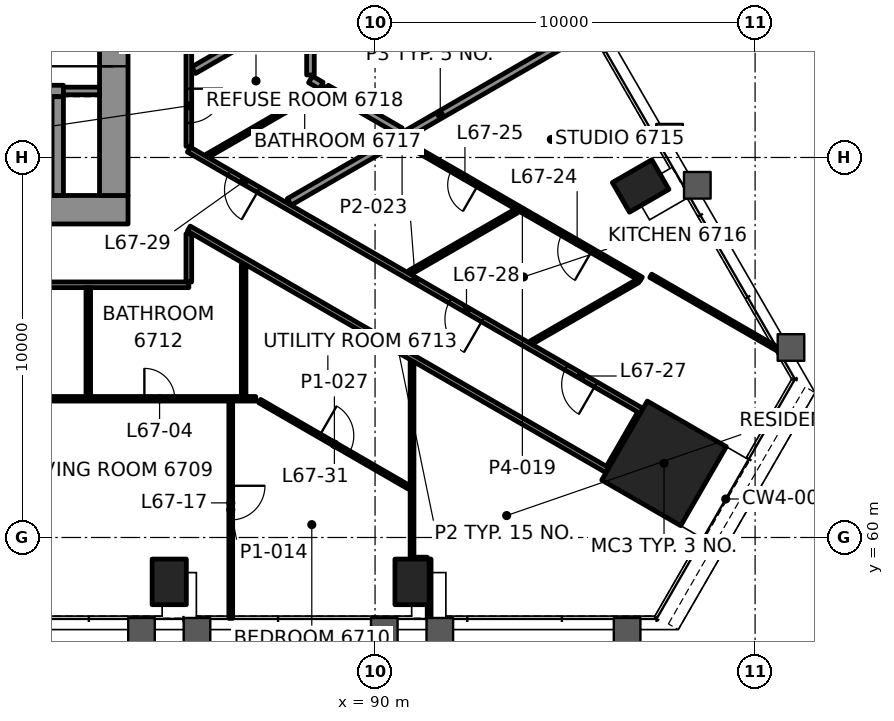
"""IFC4 building model, lengths in metres.
Left out: names, types, materials, properties, quantities, classifications, styles, units other than length and angle.
Written with IfcOpenShell. Run it as: python <this file> out.ifc"""

import sys

from ifc_helpers import new_model, si_unit, direction, frame, frame_2d, origin, origin_2d, place, context, subcontext, project, spatial, rectangle, hollow_rectangle, extrude, element, fill, save


model = new_model("IFC4")
c1 = context("Model", 3, precision=1e-05, world=origin(), true_north=direction((0.0, 1.0)))
c2 = subcontext(c1, "Body", "Model", "MODEL_VIEW")
j1 = project(units=[si_unit("LENGTHUNIT", "METRE"), si_unit("PLANEANGLEUNIT", "RADIAN")], contexts=[c1])
p1 = place(None, origin())
s1 = spatial("IfcSite", under=j1, at=p1, CompositionType="ELEMENT")
p2 = place(p1, origin())
s2 = spatial("IfcBuilding", under=s1, at=p2, CompositionType="ELEMENT")
p3 = place(p2, frame((0.0, 0.0, 281.1)))
s3 = spatial("IfcBuildingStorey", under=s2, at=p3, CompositionType="ELEMENT", Elevation=281.1)
p4 = place(p3, frame((97.604, 61.95, 0.0), z_axis=(0.0, 0.0, 1.0), x_axis=(0.5, 0.866025403784, 0.0)))
e1 = element("IfcColumn", 1, at=p4, inside=s3, PredefinedType="COLUMN", context=c2, shape_type="SweptSolid", body=[
    extrude(rectangle(XDim=2.4, YDim=2.4, at=origin_2d()), origin(), (0.0, 0.0, 1.0), 3.5),
])
for number, where, z_axis, x_axis in (
    (2, (84.584, 58.832, -0.0), (0.0, 0.0, 1.0), (1.0, 0.0, 0.0)),
    (3, (90.973, 58.832, -0.0), (0.0, 0.0, 1.0), (1.0, 0.0, 0.0)),
    (4, (96.989, 69.251, -0.0), (0.0, 0.0, 1.0), (-0.5, 0.866, 0.0)),
):
    element("IfcColumn", number, at=place(p3, frame(where, z_axis=z_axis, x_axis=x_axis)), inside=s3, PredefinedType="COLUMN", context=c2, shape_type="SweptSolid", body=[
        extrude(hollow_rectangle(XDim=0.9, YDim=1.2, WallThickness=0.06, at=origin_2d()), origin(), (0.0, 0.0, 1.0), 3.5),
    ])
p5 = place(p3, frame((66.5, 68.625, 0.0), z_axis=(0.0, 0.0, 1.0), x_axis=(1.0, 0.0, 0.0)))
e5 = element("IfcWall", 5, at=p5, inside=s3, PredefinedType="SHEAR", context=c2, shape_type="SweptSolid", body=[
    extrude(rectangle(XDim=17.0, YDim=0.75, at=frame_2d((8.5, 0.0))), origin(), (0.0, 0.0, 1.0), 3.3),
])
p6 = place(p5, frame((2.7, 0.0, 0.0)))
e6 = element("IfcOpeningElement", 6, at=p6, cuts=e5, PredefinedType="OPENING", context=c2, shape_type="SweptSolid", body=[
    extrude(rectangle(XDim=0.9, YDim=2.1, at=frame_2d((0.45, 1.05))), frame((0.0, 0.385, 0.0), z_axis=(0.0, -1.0, 0.0), x_axis=(1.0, 0.0, 0.0)), (0.0, 0.0, 1.0), 0.77),
])
p7 = place(p3, frame((83.125, 69.0, 0.0), z_axis=(0.0, 0.0, 1.0), x_axis=(0.0, 1.0, 0.0)))
e7 = element("IfcWall", 7, at=p7, inside=s3, PredefinedType="SHEAR", context=c2, shape_type="SweptSolid", body=[
    extrude(rectangle(XDim=12.0, YDim=0.75, at=frame_2d((6.0, 0.0))), origin(), (0.0, 0.0, 1.0), 3.3),
])
p8 = place(p7, frame((3.4, 0.0, 0.0)))
e8 = element("IfcOpeningElement", 8, at=p8, cuts=e7, PredefinedType="OPENING", context=c2, shape_type="SweptSolid", body=[
    extrude(rectangle(XDim=1.8, YDim=2.1, at=frame_2d((0.9, 1.05))), frame((0.0, 0.385, 0.0), z_axis=(0.0, -1.0, 0.0), x_axis=(1.0, 0.0, 0.0)), (0.0, 0.0, 1.0), 0.77),
])
p9 = place(p3, frame((70.3, 71.75, 0.0), z_axis=(0.0, 0.0, 1.0), x_axis=(1.0, 0.0, 0.0)))
e9 = element("IfcWall", 9, at=p9, inside=s3, PredefinedType="SHEAR", context=c2, shape_type="SweptSolid", body=[
    extrude(rectangle(XDim=11.5, YDim=0.3, at=frame_2d((5.75, 0.0))), origin(), (0.0, 0.0, 1.0), 3.3),
])
p10 = place(p9, frame((1.0, 0.0, 0.0)))
e10 = element("IfcOpeningElement", 10, at=p10, cuts=e9, PredefinedType="OPENING", context=c2, shape_type="SweptSolid", body=[
    extrude(rectangle(XDim=1.1, YDim=2.1, at=frame_2d((0.55, 1.05))), frame((0.0, 0.16, 0.0), z_axis=(0.0, -1.0, 0.0), x_axis=(1.0, 0.0, 0.0)), (0.0, 0.0, 1.0), 0.32),
])
p11 = place(p9, frame((3.8, 0.0, 0.0)))
e11 = element("IfcOpeningElement", 11, at=p11, cuts=e9, PredefinedType="OPENING", context=c2, shape_type="SweptSolid", body=[
    extrude(rectangle(XDim=1.1, YDim=2.1, at=frame_2d((0.55, 1.05))), frame((0.0, 0.16, 0.0), z_axis=(0.0, -1.0, 0.0), x_axis=(1.0, 0.0, 0.0)), (0.0, 0.0, 1.0), 0.32),
])
p12 = place(p9, frame((6.6, 0.0, 0.0)))
e12 = element("IfcOpeningElement", 12, at=p12, cuts=e9, PredefinedType="OPENING", context=c2, shape_type="SweptSolid", body=[
    extrude(rectangle(XDim=1.1, YDim=2.1, at=frame_2d((0.55, 1.05))), frame((0.0, 0.16, 0.0), z_axis=(0.0, -1.0, 0.0), x_axis=(1.0, 0.0, 0.0)), (0.0, 0.0, 1.0), 0.32),
])
p13 = place(p9, frame((9.4, 0.0, 0.0)))
e13 = element("IfcOpeningElement", 13, at=p13, cuts=e9, PredefinedType="OPENING", context=c2, shape_type="SweptSolid", body=[
    extrude(rectangle(XDim=1.1, YDim=2.1, at=frame_2d((0.55, 1.05))), frame((0.0, 0.16, 0.0), z_axis=(0.0, -1.0, 0.0), x_axis=(1.0, 0.0, 0.0)), (0.0, 0.0, 1.0), 0.32),
])
p14 = place(p3, frame((81.65, 69.0, 0.0), z_axis=(0.0, 0.0, 1.0), x_axis=(0.0, 1.0, 0.0)))
e14 = element("IfcWall", 14, at=p14, inside=s3, PredefinedType="SHEAR", context=c2, shape_type="SweptSolid", body=[
    extrude(rectangle(XDim=2.6, YDim=0.3, at=frame_2d((1.3, 0.0))), origin(), (0.0, 0.0, 1.0), 3.3),
])
p15 = place(p3, frame((91.023, 59.432, 0.0), z_axis=(0.0, 0.0, 1.0), x_axis=(1.0, 0.0, 0.0)))
e15 = element("IfcWall", 15, at=p15, inside=s3, PredefinedType="PARTITIONING", context=c2, shape_type="SweptSolid", body=[
    extrude(rectangle(XDim=0.349, YDim=0.1, at=frame_2d((0.175, 0.0))), origin(), (0.0, 0.0, 1.0), 2.7),
])
p16 = place(p3, frame((73.935, 63.65, 0.0), z_axis=(0.0, 0.0, 1.0), x_axis=(1.0, 0.0, 0.0)))
e16 = element("IfcWall", 16, at=p16, inside=s3, PredefinedType="PARTITIONING", context=c2, shape_type="SweptSolid", body=[
    extrude(rectangle(XDim=12.924, YDim=0.12, at=frame_2d((6.462, 0.0))), origin(), (0.0, 0.0, 1.0), 2.7),
])
p17 = place(p16, frame((6.197, 0.0, 0.0)))
e17 = element("IfcOpeningElement", 17, at=p17, cuts=e16, PredefinedType="OPENING", context=c2, shape_type="SweptSolid", body=[
    extrude(rectangle(XDim=0.9, YDim=2.1, at=frame_2d((0.45, 1.05))), frame((0.0, 0.07, 0.0), z_axis=(0.0, -1.0, 0.0), x_axis=(1.0, 0.0, 0.0)), (0.0, 0.0, 1.0), 0.14),
])
p18 = place(p16, frame((9.995, 0.0, 0.0)))
e18 = element("IfcOpeningElement", 18, at=p18, cuts=e16, PredefinedType="OPENING", context=c2, shape_type="SweptSolid", body=[
    extrude(rectangle(XDim=0.8, YDim=2.1, at=frame_2d((0.4, 1.05))), frame((0.0, 0.07, 0.0), z_axis=(0.0, -1.0, 0.0), x_axis=(1.0, 0.0, 0.0)), (0.0, 0.0, 1.0), 0.14),
])
p19 = place(p3, frame((85.1, 66.65, 0.0), z_axis=(0.0, 0.0, 1.0), x_axis=(-1.0, 0.0, 0.0)))
e19 = element("IfcWall", 19, at=p19, inside=s3, PredefinedType="PARTITIONING", context=c2, shape_type="SweptSolid", body=[
    extrude(rectangle(XDim=20.2, YDim=0.15, at=frame_2d((10.1, 0.0))), origin(), (0.0, 0.0, 1.0), 2.7),
])
p20 = place(p19, frame((6.405, 0.0, 0.0)))
e20 = element("IfcOpeningElement", 20, at=p20, cuts=e19, PredefinedType="OPENING", context=c2, shape_type="SweptSolid", body=[
    extrude(rectangle(XDim=1.0, YDim=2.1, at=frame_2d((0.5, 1.05))), frame((0.0, 0.085, 0.0), z_axis=(0.0, -1.0, 0.0), x_axis=(1.0, 0.0, 0.0)), (0.0, 0.0, 1.0), 0.17),
])
p21 = place(p19, frame((12.845, 0.0, 0.0)))
e21 = element("IfcOpeningElement", 21, at=p21, cuts=e19, PredefinedType="OPENING", context=c2, shape_type="SweptSolid", body=[
    extrude(rectangle(XDim=0.9, YDim=2.1, at=frame_2d((0.45, 1.05))), frame((0.0, 0.085, 0.0), z_axis=(0.0, -1.0, 0.0), x_axis=(1.0, 0.0, 0.0)), (0.0, 0.0, 1.0), 0.17),
])
p22 = place(p3, frame((94.104, 65.126, 0.0), z_axis=(0.0, 0.0, 1.0), x_axis=(0.866000336211, 0.500043415797, 0.0)))
e22 = element("IfcWall", 22, at=p22, inside=s3, PredefinedType="PARTITIONING", context=c2, shape_type="SweptSolid", body=[
    extrude(rectangle(XDim=3.248, YDim=0.1, at=frame_2d((1.624, 0.0))), origin(), (0.0, 0.0, 1.0), 2.7),
])
p23 = place(p3, frame((90.918, 66.975, 0.0), z_axis=(0.0, 0.0, 1.0), x_axis=(0.86605210011, 0.499953757757, 0.0)))
e23 = element("IfcWall", 23, at=p23, inside=s3, PredefinedType="PARTITIONING", context=c2, shape_type="SweptSolid", body=[
    extrude(rectangle(XDim=3.228, YDim=0.12, at=frame_2d((1.614, 0.0))), origin(), (0.0, 0.0, 1.0), 2.7),
])
p24 = place(p3, frame((87.741, 68.83, 0.0), z_axis=(0.0, 0.0, 1.0), x_axis=(0.866026579827, 0.499997963029, 0.0)))
e24 = element("IfcWall", 24, at=p24, inside=s3, PredefinedType="PARTITIONING", context=c2, shape_type="SweptSolid", body=[
    extrude(rectangle(XDim=9.179, YDim=0.2, at=frame_2d((4.59, 0.0))), origin(), (0.0, 0.0, 1.0), 2.688),
])
p25 = place(p3, frame((85.585, 70.045, 0.0), z_axis=(0.0, 0.0, 1.0), x_axis=(0.866004928679, 0.500035462246, 0.0)))
e25 = element("IfcWall", 25, at=p25, inside=s3, PredefinedType="PARTITIONING", context=c2, shape_type="SweptSolid", body=[
    extrude(rectangle(XDim=3.578, YDim=0.1, at=frame_2d((1.789, 0.0))), origin(), (0.0, 0.0, 1.0), 2.7),
])
p26 = place(p3, frame((85.227, 72.297, 0.0), z_axis=(0.0, 0.0, 1.0), x_axis=(0.866002113569, 0.500040337666, 0.0)))
e26 = element("IfcWall", 26, at=p26, inside=s3, PredefinedType="PARTITIONING", context=c2, shape_type="SweptSolid", body=[
    extrude(rectangle(XDim=3.258, YDim=0.2, at=frame_2d((1.629, 0.0))), origin(), (0.0, 0.0, 1.0), 2.7),
])
p27 = place(p3, frame((96.153, 61.835, 0.0), z_axis=(0.0, 0.0, 1.0), x_axis=(0.500008692254, 0.866020385251, 0.0)))
e27 = element("IfcWall", 27, at=p27, inside=s3, PredefinedType="PARTITIONING", context=c2, shape_type="SweptSolid", body=[
    extrude(rectangle(XDim=1.649, YDim=0.15, at=frame_2d((0.824, 0.0))), origin(), (0.0, 0.0, 1.0), 2.547),
])
p28 = place(p3, frame((91.423, 57.872, 0.0), z_axis=(0.0, 0.0, 1.0), x_axis=(0.0, 1.0, 0.0)))
e28 = element("IfcWall", 28, at=p28, inside=s3, PredefinedType="PARTITIONING", context=c2, shape_type="SweptSolid", body=[
    extrude(rectangle(XDim=1.559, YDim=0.1, at=frame_2d((0.78, 0.0))), origin(), (0.0, 0.0, 1.0), 2.7),
])
p29 = place(p3, frame((90.973, 59.432, 0.0), z_axis=(0.0, 0.0, 1.0), x_axis=(0.0, 1.0, 0.0)))
e29 = element("IfcWall", 29, at=p29, inside=s3, PredefinedType="PARTITIONING", context=c2, shape_type="SweptSolid", body=[
    extrude(rectangle(XDim=5.19, YDim=0.1, at=frame_2d((2.595, 0.0))), origin(), (0.0, 0.0, 1.0), 2.7),
])
p30 = place(p3, frame((88.3, 72.171, 0.0), z_axis=(0.0, 0.0, 1.0), x_axis=(0.0, 1.0, 0.0)))
e30 = element("IfcWall", 30, at=p30, inside=s3, PredefinedType="PARTITIONING", context=c2, shape_type="SweptSolid", body=[
    extrude(rectangle(XDim=1.724, YDim=0.2, at=frame_2d((0.862, 0.0))), origin(), (0.0, 0.0, 1.0), 2.7),
])
p31 = place(p3, frame((86.542, 63.71, 0.0), z_axis=(0.0, 0.0, 1.0), x_axis=(0.0, 1.0, 0.0)))
e31 = element("IfcWall", 31, at=p31, inside=s3, PredefinedType="PARTITIONING", context=c2, shape_type="SweptSolid", body=[
    extrude(rectangle(XDim=3.46, YDim=0.12, at=frame_2d((1.73, 0.0))), origin(), (0.0, 0.0, 1.0), 2.547),
])
p32 = place(p3, frame((86.203, 63.59, 0.0), z_axis=(0.0, 0.0, 1.0), x_axis=(0.0, -1.0, 0.0)))
e32 = element("IfcWall", 32, at=p32, inside=s3, PredefinedType="PARTITIONING", context=c2, shape_type="SweptSolid", body=[
    extrude(rectangle(XDim=5.718, YDim=0.1, at=frame_2d((2.859, 0.0))), origin(), (0.0, 0.0, 1.0), 2.7),
])
p33 = place(p32, frame((2.229, 0.0, 0.0)))
e33 = element("IfcOpeningElement", 33, at=p33, cuts=e32, PredefinedType="OPENING", context=c2, shape_type="SweptSolid", body=[
    extrude(rectangle(XDim=0.9, YDim=2.1, at=frame_2d((0.45, 1.05))), frame((0.0, 0.06, 0.0), z_axis=(0.0, -1.0, 0.0), x_axis=(1.0, 0.0, 0.0)), (0.0, 0.0, 1.0), 0.12),
])
p34 = place(p3, frame((85.1, 66.725, 0.0), z_axis=(0.0, 0.0, 1.0), x_axis=(0.0, 1.0, 0.0)))
e34 = element("IfcWall", 34, at=p34, inside=s3, PredefinedType="PARTITIONING", context=c2, shape_type="SweptSolid", body=[
    extrude(rectangle(XDim=1.268, YDim=0.15, at=frame_2d((0.634, 0.0))), origin(), (0.0, 0.0, 1.0), 2.547),
])
p35 = place(p3, frame((85.1, 83.348, 0.0), z_axis=(0.0, 0.0, 1.0), x_axis=(0.0, -1.0, 0.0)))
e35 = element("IfcWall", 35, at=p35, inside=s3, PredefinedType="PARTITIONING", context=c2, shape_type="SweptSolid", body=[
    extrude(rectangle(XDim=13.053, YDim=0.15, at=frame_2d((6.527, 0.0))), origin(), (0.0, 0.0, 1.0), 2.7),
])
p36 = place(p35, frame((8.78, 0.0, 0.0)))
e36 = element("IfcOpeningElement", 36, at=p36, cuts=e35, PredefinedType="OPENING", context=c2, shape_type="SweptSolid", body=[
    extrude(rectangle(XDim=1.0, YDim=2.1, at=frame_2d((0.5, 1.05))), frame((0.0, 0.085, 0.0), z_axis=(0.0, -1.0, 0.0), x_axis=(1.0, 0.0, 0.0)), (0.0, 0.0, 1.0), 0.17),
])
p37 = place(p35, frame((11.537, 0.0, 0.0)))
e37 = element("IfcOpeningElement", 37, at=p37, cuts=e35, PredefinedType="OPENING", context=c2, shape_type="SweptSolid", body=[
    extrude(rectangle(XDim=0.9, YDim=2.1, at=frame_2d((0.45, 1.05))), frame((0.0, 0.085, 0.0), z_axis=(0.0, -1.0, 0.0), x_axis=(1.0, 0.0, 0.0)), (0.0, 0.0, 1.0), 0.17),
])
p38 = place(p3, frame((82.454, 63.71, 0.0), z_axis=(0.0, 0.0, 1.0), x_axis=(0.0, 1.0, 0.0)))
e38 = element("IfcWall", 38, at=p38, inside=s3, PredefinedType="PARTITIONING", context=c2, shape_type="SweptSolid", body=[
    extrude(rectangle(XDim=2.865, YDim=0.12, at=frame_2d((1.433, 0.0))), origin(), (0.0, 0.0, 1.0), 2.7),
])
p39 = place(p3, frame((100.566, 64.974, 0.0), z_axis=(0.0, 0.0, 1.0), x_axis=(-0.8660389038, 0.499976616558, 0.0)))
e39 = element("IfcWall", 39, at=p39, inside=s3, PredefinedType="PARTITIONING", context=c2, shape_type="SweptSolid", body=[
    extrude(rectangle(XDim=3.825, YDim=0.1, at=frame_2d((1.913, 0.0))), origin(), (0.0, 0.0, 1.0), 2.7),
])
p40 = place(p3, frame((90.662, 70.692, 0.0), z_axis=(0.0, 0.0, 1.0), x_axis=(-0.866034963436, 0.499983441833, 0.0)))
e40 = element("IfcWall", 40, at=p40, inside=s3, PredefinedType="PARTITIONING", context=c2, shape_type="SweptSolid", body=[
    extrude(rectangle(XDim=2.24, YDim=0.2, at=frame_2d((1.12, 0.0))), origin(), (0.0, 0.0, 1.0), 2.7),
])
p41 = place(p3, frame((97.003, 66.8, 0.0), z_axis=(0.0, 0.0, 1.0), x_axis=(-0.866012764826, 0.500021890679, 0.0)))
e41 = element("IfcWall", 41, at=p41, inside=s3, PredefinedType="PARTITIONING", context=c2, shape_type="SweptSolid", body=[
    extrude(rectangle(XDim=7.222, YDim=0.12, at=frame_2d((3.611, 0.0))), origin(), (0.0, 0.0, 1.0), 2.7),
])
p42 = place(p41, frame((1.496, 0.0, 0.0)))
e42 = element("IfcOpeningElement", 42, at=p42, cuts=e41, PredefinedType="OPENING", context=c2, shape_type="SweptSolid", body=[
    extrude(rectangle(XDim=0.9, YDim=2.1, at=frame_2d((0.45, 1.05))), frame((0.0, 0.07, 0.0), z_axis=(0.0, -1.0, 0.0), x_axis=(1.0, 0.0, 0.0)), (0.0, 0.0, 1.0), 0.14),
])
p43 = place(p41, frame((4.956, 0.0, 0.0)))
e43 = element("IfcOpeningElement", 43, at=p43, cuts=e41, PredefinedType="OPENING", context=c2, shape_type="SweptSolid", body=[
    extrude(rectangle(XDim=0.8, YDim=2.1, at=frame_2d((0.4, 1.05))), frame((0.0, 0.07, 0.0), z_axis=(0.0, -1.0, 0.0), x_axis=(1.0, 0.0, 0.0)), (0.0, 0.0, 1.0), 0.14),
])
p44 = place(p3, frame((97.014, 63.329, 0.0), z_axis=(0.0, 0.0, 1.0), x_axis=(-0.866023045711, 0.500004084281, 0.0)))
e44 = element("IfcWall", 44, at=p44, inside=s3, PredefinedType="PARTITIONING", context=c2, shape_type="SweptSolid", body=[
    extrude(rectangle(XDim=13.757, YDim=0.15, at=frame_2d((6.879, 0.0))), origin(), (0.0, 0.0, 1.0), 2.7),
])
p45 = place(p44, frame((1.39, 0.0, 0.0)))
e45 = element("IfcOpeningElement", 45, at=p45, cuts=e44, PredefinedType="OPENING", context=c2, shape_type="SweptSolid", body=[
    extrude(rectangle(XDim=0.9, YDim=2.1, at=frame_2d((0.45, 1.05))), frame((0.0, 0.085, 0.0), z_axis=(0.0, -1.0, 0.0), x_axis=(1.0, 0.0, 0.0)), (0.0, 0.0, 1.0), 0.17),
])
p46 = place(p44, frame((4.821, 0.0, 0.0)))
e46 = element("IfcOpeningElement", 46, at=p46, cuts=e44, PredefinedType="OPENING", context=c2, shape_type="SweptSolid", body=[
    extrude(rectangle(XDim=1.0, YDim=2.1, at=frame_2d((0.5, 1.05))), frame((0.0, 0.085, 0.0), z_axis=(0.0, -1.0, 0.0), x_axis=(1.0, 0.0, 0.0)), (0.0, 0.0, 1.0), 0.17),
])
p47 = place(p44, frame((11.634, 0.0, 0.0)))
e47 = element("IfcOpeningElement", 47, at=p47, cuts=e44, PredefinedType="OPENING", context=c2, shape_type="SweptSolid", body=[
    extrude(rectangle(XDim=0.9, YDim=2.1, at=frame_2d((0.45, 1.05))), frame((0.0, 0.085, 0.0), z_axis=(0.0, -1.0, 0.0), x_axis=(1.0, 0.0, 0.0)), (0.0, 0.0, 1.0), 0.17),
])
p48 = place(p3, frame((96.114, 61.771, 0.0), z_axis=(0.0, 0.0, 1.0), x_axis=(-0.866021912989, 0.500006046186, 0.0)))
e48 = element("IfcWall", 48, at=p48, inside=s3, PredefinedType="PARTITIONING", context=c2, shape_type="SweptSolid", body=[
    extrude(rectangle(XDim=12.718, YDim=0.15, at=frame_2d((6.359, 0.0))), origin(), (0.0, 0.0, 1.0), 2.547),
])
p49 = place(p3, frame((86.963, 63.59, 0.0), z_axis=(0.0, 0.0, 1.0), x_axis=(0.866028993663, -0.499993782096, 0.0)))
e49 = element("IfcWall", 49, at=p49, inside=s3, PredefinedType="PARTITIONING", context=c2, shape_type="SweptSolid", body=[
    extrude(rectangle(XDim=4.543, YDim=0.1, at=frame_2d((2.272, 0.0))), origin(), (0.0, 0.0, 1.0), 2.7),
])
p50 = place(p49, frame((1.822, 0.0, 0.0)))
e50 = element("IfcOpeningElement", 50, at=p50, cuts=e49, PredefinedType="OPENING", context=c2, shape_type="SweptSolid", body=[
    extrude(rectangle(XDim=0.9, YDim=2.1, at=frame_2d((0.45, 1.05))), frame((0.0, 0.06, 0.0), z_axis=(0.0, -1.0, 0.0), x_axis=(1.0, 0.0, 0.0)), (0.0, 0.0, 1.0), 0.12),
])
p51 = place(p3, frame((88.584, 71.892, 0.0), z_axis=(0.0, 0.0, 1.0), x_axis=(-0.865987003449, 0.500066505434, 0.0)))
e51 = element("IfcWall", 51, at=p51, inside=s3, PredefinedType="PARTITIONING", context=c2, shape_type="SweptSolid", body=[
    extrude(rectangle(XDim=0.328, YDim=0.2, at=frame_2d((0.164, 0.0))), origin(), (0.0, 0.0, 1.0), 2.7),
])
p52 = place(p3, frame((97.849, 57.651, 0.0), z_axis=(0.0, 0.0, 1.0), x_axis=(0.499986626058, 0.866033125095, 0.0)))
e52 = element("IfcWall", 52, at=p52, inside=s3, PredefinedType="PARAPET", context=c2, shape_type="SweptSolid", body=[
    extrude(rectangle(XDim=7.2, YDim=0.3, at=frame_2d((3.6, 0.0))), origin(), (0.0, 0.0, 1.0), 1.1),
])
p53 = place(p3, frame((81.8, 71.75, 0.0), z_axis=(0.0, 0.0, 1.0), x_axis=(1.0, 0.0, 0.0)))
e53 = element("IfcWall", 53, at=p53, inside=s3, PredefinedType="PARTITIONING", context=c2, shape_type="SweptSolid", body=[
    extrude(rectangle(XDim=0.95, YDim=0.2, at=frame_2d((0.475, 0.0))), origin(), (0.0, 0.0, 1.0), 3.3),
])
p54 = place(p18, origin())
e54 = element("IfcDoor", 54, at=p54, inside=s3, OperationType="SINGLE_SWING_LEFT", PredefinedType="DOOR", context=c2, shape_type="SweptSolid", body=[
    extrude(rectangle(XDim=0.8, YDim=2.1, at=frame_2d((0.4, 1.05))), frame((0.0, 0.025, 0.0), z_axis=(0.0, -1.0, 0.0), x_axis=(1.0, 0.0, 0.0)), (0.0, 0.0, 1.0), 0.05),
])
fill(e18, e54)
p55 = place(p33, origin())
e55 = element("IfcDoor", 55, at=p55, inside=s3, OperationType="SINGLE_SWING_LEFT", PredefinedType="DOOR", context=c2, shape_type="SweptSolid", body=[
    extrude(rectangle(XDim=0.9, YDim=2.1, at=frame_2d((0.45, 1.05))), frame((0.0, 0.025, 0.0), z_axis=(0.0, -1.0, 0.0), x_axis=(1.0, 0.0, 0.0)), (0.0, 0.0, 1.0), 0.05),
])
fill(e33, e55)
p56 = place(p37, origin())
e56 = element("IfcDoor", 56, at=p56, inside=s3, OperationType="SINGLE_SWING_LEFT", PredefinedType="DOOR", context=c2, shape_type="SweptSolid", body=[
    extrude(rectangle(XDim=0.9, YDim=2.1, at=frame_2d((0.45, 1.05))), frame((0.0, 0.025, 0.0), z_axis=(0.0, -1.0, 0.0), x_axis=(1.0, 0.0, 0.0)), (0.0, 0.0, 1.0), 0.05),
])
fill(e37, e56)
p57 = place(p42, origin())
e57 = element("IfcDoor", 57, at=p57, inside=s3, OperationType="SINGLE_SWING_RIGHT", PredefinedType="DOOR", context=c2, shape_type="SweptSolid", body=[
    extrude(rectangle(XDim=0.9, YDim=2.1, at=frame_2d((0.45, 1.05))), frame((0.0, 0.025, 0.0), z_axis=(0.0, -1.0, 0.0), x_axis=(1.0, 0.0, 0.0)), (0.0, 0.0, 1.0), 0.05),
])
fill(e42, e57)
p58 = place(p43, origin())
e58 = element("IfcDoor", 58, at=p58, inside=s3, OperationType="SINGLE_SWING_RIGHT", PredefinedType="DOOR", context=c2, shape_type="SweptSolid", body=[
    extrude(rectangle(XDim=0.8, YDim=2.1, at=frame_2d((0.4, 1.05))), frame((0.0, 0.025, 0.0), z_axis=(0.0, -1.0, 0.0), x_axis=(1.0, 0.0, 0.0)), (0.0, 0.0, 1.0), 0.05),
])
fill(e43, e58)
p59 = place(p45, origin())
e59 = element("IfcDoor", 59, at=p59, inside=s3, OperationType="SINGLE_SWING_LEFT", PredefinedType="DOOR", context=c2, shape_type="SweptSolid", body=[
    extrude(rectangle(XDim=0.9, YDim=2.1, at=frame_2d((0.45, 1.05))), frame((0.0, 0.025, 0.0), z_axis=(0.0, -1.0, 0.0), x_axis=(1.0, 0.0, 0.0)), (0.0, 0.0, 1.0), 0.05),
])
fill(e45, e59)
p60 = place(p46, origin())
e60 = element("IfcDoor", 60, at=p60, inside=s3, OperationType="SINGLE_SWING_LEFT", PredefinedType="DOOR", context=c2, shape_type="SweptSolid", body=[
    extrude(rectangle(XDim=1.0, YDim=2.1, at=frame_2d((0.5, 1.05))), frame((0.0, 0.025, 0.0), z_axis=(0.0, -1.0, 0.0), x_axis=(1.0, 0.0, 0.0)), (0.0, 0.0, 1.0), 0.05),
])
fill(e46, e60)
p61 = place(p47, origin())
e61 = element("IfcDoor", 61, at=p61, inside=s3, OperationType="SINGLE_SWING_LEFT", PredefinedType="DOOR", context=c2, shape_type="SweptSolid", body=[
    extrude(rectangle(XDim=0.9, YDim=2.1, at=frame_2d((0.45, 1.05))), frame((0.0, 0.025, 0.0), z_axis=(0.0, -1.0, 0.0), x_axis=(1.0, 0.0, 0.0)), (0.0, 0.0, 1.0), 0.05),
])
fill(e47, e61)
p62 = place(p50, origin())
e62 = element("IfcDoor", 62, at=p62, inside=s3, OperationType="SINGLE_SWING_LEFT", PredefinedType="DOOR", context=c2, shape_type="SweptSolid", body=[
    extrude(rectangle(XDim=0.9, YDim=2.1, at=frame_2d((0.45, 1.05))), frame((0.0, 0.025, 0.0), z_axis=(0.0, -1.0, 0.0), x_axis=(1.0, 0.0, 0.0)), (0.0, 0.0, 1.0), 0.05),
])
fill(e50, e62)
p63 = place(p8, origin())
e63 = element("IfcDoor", 63, at=p63, inside=s3, OperationType="SINGLE_SWING_LEFT", PredefinedType="DOOR", context=c2, shape_type="SweptSolid", body=[
    extrude(rectangle(XDim=1.8, YDim=2.1, at=frame_2d((0.9, 1.05))), frame((0.0, 0.095, 0.0), z_axis=(0.0, -1.0, 0.0), x_axis=(1.0, 0.0, 0.0)), (0.0, 0.0, 1.0), 0.19),
])
fill(e8, e63)
save(model, sys.argv[1])
